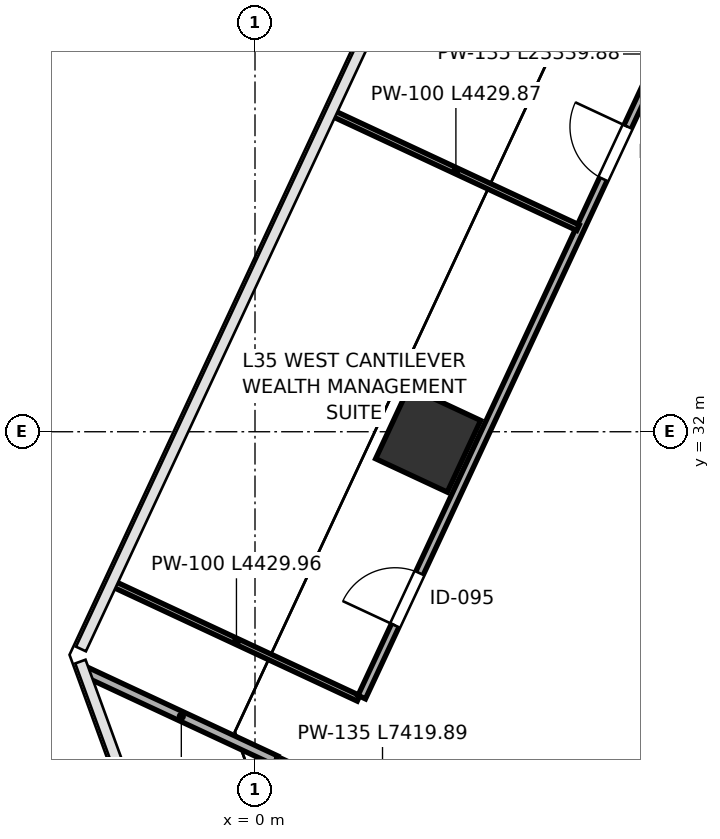
"""IFC4 building model, lengths in metres.
Left out: names, types, materials, properties, quantities, classifications, styles, units other than length and angle.
Written with IfcOpenShell. Run it as: python <this file> out.ifc"""

import sys

from ifc_helpers import new_model, si_unit, direction, frame, frame_2d, origin, origin_2d, place, context, subcontext, project, spatial, rectangle, extrude, clip, halfspace, source, transform, mapped, element, fill, save


model = new_model("IFC4")
c1 = context("Model", 3, precision=1e-05, world=origin(), true_north=direction((0.0, 1.0)))
c2 = subcontext(c1, "Body", "Model", "MODEL_VIEW")
j1 = project(units=[si_unit("LENGTHUNIT", "METRE"), si_unit("PLANEANGLEUNIT", "RADIAN")], contexts=[c1])
p1 = place(None, origin())
s1 = spatial("IfcSite", under=j1, at=p1, CompositionType="ELEMENT")
p2 = place(p1, origin())
s2 = spatial("IfcBuilding", under=s1, at=p2, CompositionType="ELEMENT")
p3 = place(p2, frame((0.0, 0.0, 158.2)))
s3 = spatial("IfcBuildingStorey", under=s2, at=p3, CompositionType="ELEMENT", Elevation=158.2)
p4 = place(p3, frame((2.848, 31.871, 0.0), z_axis=(0.000347150303, 0.096449925889, 0.995337777482), x_axis=(0.904787896664, -0.423907231175, 0.040761764052)))
e1 = element("IfcColumn", 1, at=p4, inside=s3, PredefinedType="COLUMN", context=c2, shape_type="Clipping", body=[
    clip(clip(extrude(rectangle(XDim=1.3, YDim=1.3, at=origin_2d()), origin(), (0.0, 0.0, 1.0), 4.22), halfspace(frame((0.0, 0.0, 0.084), z_axis=(0.0, 0.0, -1.0), x_axis=(1.0, 0.0, 0.0)), False)), halfspace(frame((0.0, 0.0, 4.135), z_axis=(0.0, 0.0, 1.0), x_axis=(1.0, 0.0, 0.0)), False)),
])
p5 = place(p3, frame((-2.767, 28.045, 0.0), z_axis=(0.0, 0.0, 1.0), x_axis=(0.906313941013, -0.422605064246, 0.0)))
e2 = element("IfcWall", 2, at=p5, inside=s3, PredefinedType="PARTITIONING", context=c2, shape_type="SweptSolid", body=[
    extrude(rectangle(XDim=3.432, YDim=0.16, at=frame_2d((1.716, 0.0))), origin(), (0.0, 0.0, 1.0), 3.96),
])
p6 = place(p3, frame((0.416, 26.561, 0.0), z_axis=(0.0, 0.0, 1.0), x_axis=(0.906307511488, -0.422618852656, 0.0)))
e3 = element("IfcWall", 3, at=p6, inside=s3, PredefinedType="PARTITIONING", context=c2, shape_type="SweptSolid", body=[
    extrude(rectangle(XDim=7.42, YDim=0.135, at=frame_2d((3.71, 0.0))), origin(), (0.0, 0.0, 1.0), 3.96),
])
p7 = place(p6, frame((2.9, 0.0, 0.0)))
e4 = element("IfcOpeningElement", 4, at=p7, cuts=e3, PredefinedType="OPENING", context=c2, shape_type="SweptSolid", body=[
    extrude(rectangle(XDim=0.9, YDim=2.15, at=frame_2d((0.45, 1.075))), frame((0.0, 0.078, 0.0), z_axis=(0.0, -1.0, 0.0), x_axis=(1.0, 0.0, 0.0)), (0.0, 0.0, 1.0), 0.155),
])
p8 = place(p6, frame((5.0, 0.0, 0.0)))
e5 = element("IfcOpeningElement", 5, at=p8, cuts=e3, PredefinedType="OPENING", context=c2, shape_type="SweptSolid", body=[
    extrude(rectangle(XDim=0.95, YDim=2.15, at=frame_2d((0.475, 1.075))), frame((0.0, 0.078, 0.0), z_axis=(0.0, -1.0, 0.0), x_axis=(1.0, 0.0, 0.0)), (0.0, 0.0, 1.0), 0.155),
])
p9 = place(p3, frame((-2.312, 29.488, 0.0), z_axis=(0.0, 0.0, 1.0), x_axis=(0.906316851894, -0.422598821546, 0.0)))
e6 = element("IfcWall", 6, at=p9, inside=s3, PredefinedType="PARTITIONING", context=c2, shape_type="SweptSolid", body=[
    extrude(rectangle(XDim=4.43, YDim=0.1, at=frame_2d((2.215, 0.0))), origin(), (0.0, 0.0, 1.0), 3.96),
])
p10 = place(p3, frame((1.756, 27.635, 0.0), z_axis=(0.0, 0.0, 1.0), x_axis=(0.422615732035, 0.906308966653, 0.0)))
e7 = element("IfcWall", 7, at=p10, inside=s3, PredefinedType="PARTITIONING", context=c2, shape_type="SweptSolid", body=[
    extrude(rectangle(XDim=23.34, YDim=0.135, at=frame_2d((11.67, 0.0))), origin(), (0.0, 0.0, 1.0), 3.96),
])
p11 = place(p10, frame((1.3, 0.0, 0.0)))
e8 = element("IfcOpeningElement", 8, at=p11, cuts=e7, PredefinedType="OPENING", context=c2, shape_type="SweptSolid", body=[
    extrude(rectangle(XDim=0.95, YDim=2.15, at=frame_2d((0.475, 1.075))), frame((0.0, 0.078, 0.0), z_axis=(0.0, -1.0, 0.0), x_axis=(1.0, 0.0, 0.0)), (0.0, 0.0, 1.0), 0.155),
])
p12 = place(p10, frame((9.4, 0.0, 0.0)))
e9 = element("IfcOpeningElement", 9, at=p12, cuts=e7, PredefinedType="OPENING", context=c2, shape_type="SweptSolid", body=[
    extrude(rectangle(XDim=0.95, YDim=2.15, at=frame_2d((0.475, 1.075))), frame((0.0, 0.078, 0.0), z_axis=(0.0, -1.0, 0.0), x_axis=(1.0, 0.0, 0.0)), (0.0, 0.0, 1.0), 0.155),
])
p13 = place(p3, frame((1.297, 37.228, 0.0), z_axis=(0.0, 0.0, 1.0), x_axis=(0.906295742894, -0.422644089526, 0.0)))
e10 = element("IfcWall", 10, at=p13, inside=s3, PredefinedType="PARTITIONING", context=c2, shape_type="SweptSolid", body=[
    extrude(rectangle(XDim=4.43, YDim=0.1, at=frame_2d((2.215, 0.0))), origin(), (0.0, 0.0, 1.0), 3.195),
])
m1 = source(origin(), c2, "Body", "SweptSolid", [
    extrude(rectangle(XDim=0.95, YDim=2.15, at=frame_2d((0.475, 1.075))), frame((0.0, 0.025, 0.0), z_axis=(0.0, -1.0, 0.0), x_axis=(1.0, 0.0, 0.0)), (0.0, 0.0, 1.0), 0.05),
])
p14 = place(p11, origin())
e11 = element("IfcDoor", 11, at=p14, inside=s3, OperationType="SINGLE_SWING_LEFT", PredefinedType="DOOR", context=c2, shape_type="MappedRepresentation", body=[
    mapped(m1, transform((0.0, 0.0, 0.0), scale=1.0)),
])
fill(e8, e11)
p15 = place(p12, origin())
e12 = element("IfcDoor", 12, at=p15, inside=s3, OperationType="SINGLE_SWING_RIGHT", PredefinedType="DOOR", context=c2, shape_type="MappedRepresentation", body=[
    mapped(m1, transform((0.0, 0.0, 0.0), scale=1.0)),
])
fill(e9, e12)
save(model, sys.argv[1])
